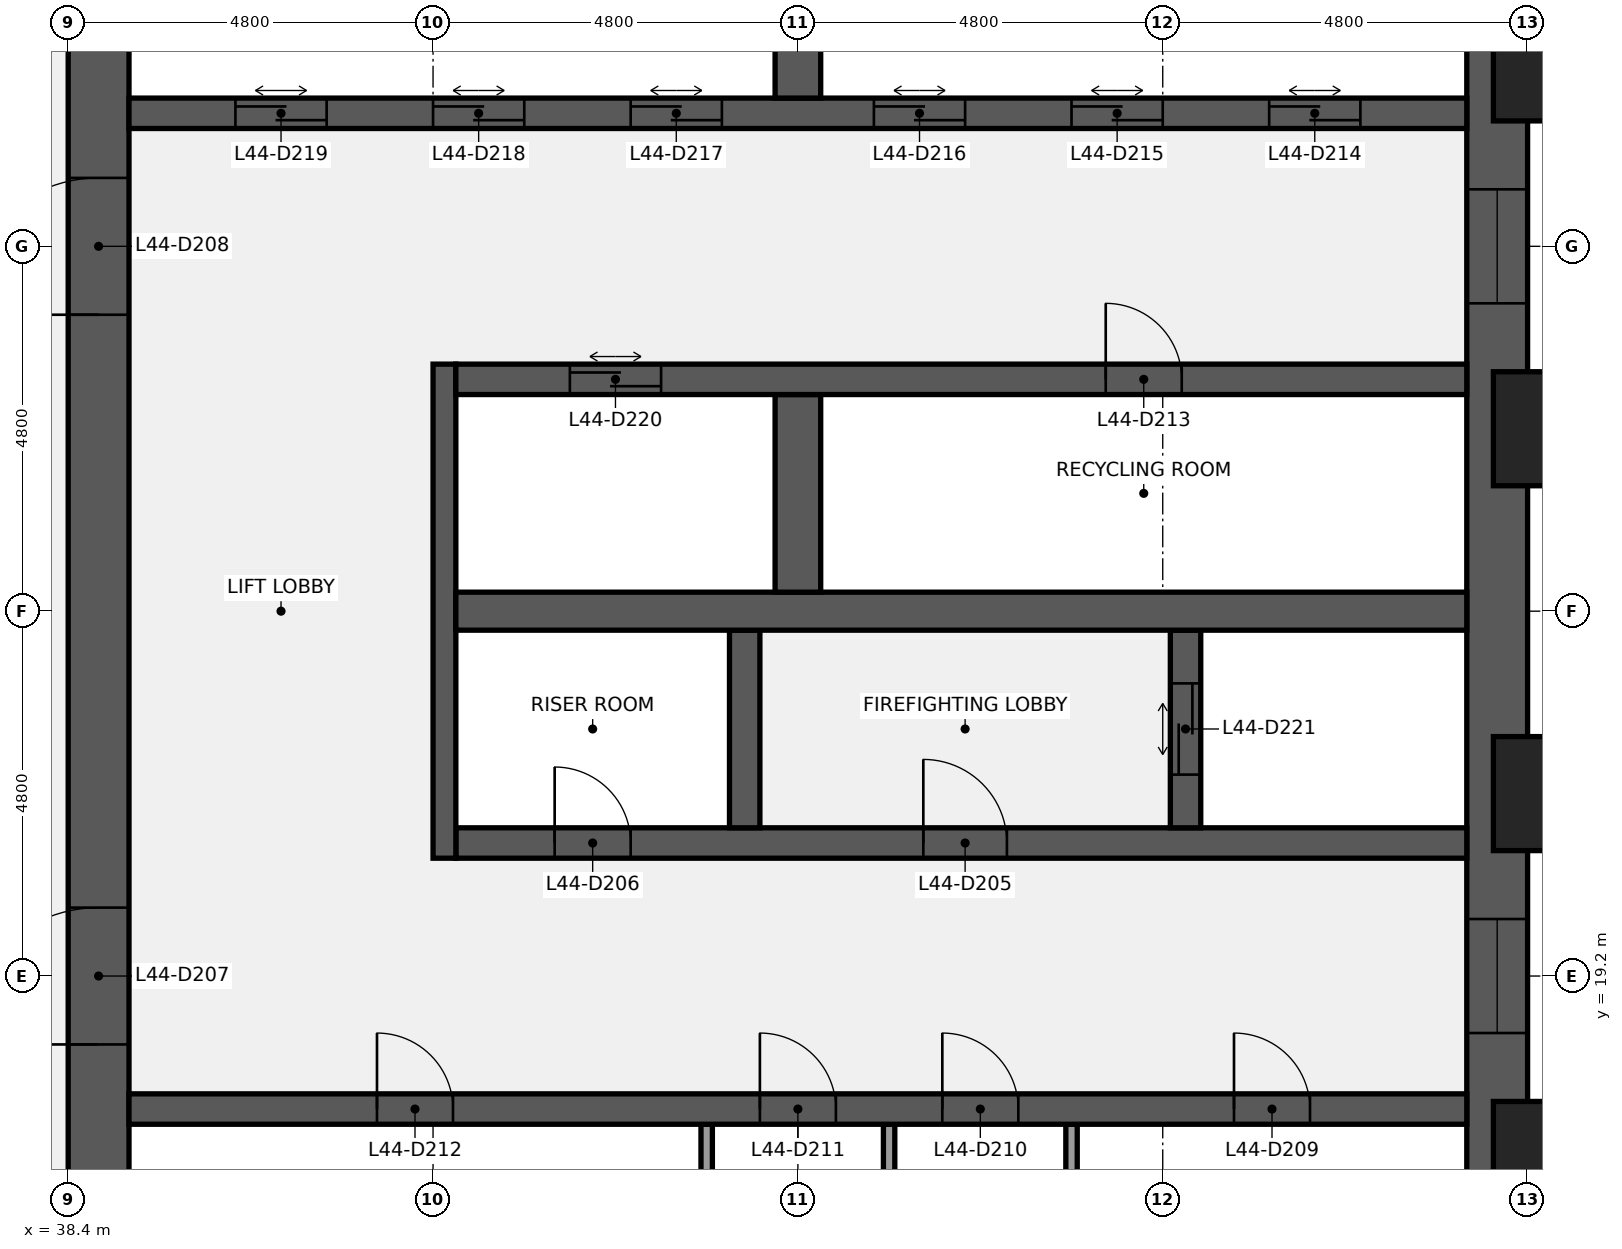
"""IFC4 building model, lengths in metres.
Left out: names, types, materials, properties, quantities, classifications, styles, units other than length and angle.
Written with IfcOpenShell. Run it as: python <this file> out.ifc"""

import sys

from ifc_helpers import new_model, si_unit, direction, frame, frame_2d, origin, origin_2d, place, context, subcontext, project, spatial, rectangle, extrude, element, fill, save


model = new_model("IFC4")
c1 = context("Model", 3, precision=1e-05, world=origin(), true_north=direction((0.0, 1.0)))
c2 = subcontext(c1, "Body", "Model", "MODEL_VIEW")
j1 = project(units=[si_unit("LENGTHUNIT", "METRE"), si_unit("PLANEANGLEUNIT", "RADIAN")], contexts=[c1])
p1 = place(None, origin())
s1 = spatial("IfcSite", under=j1, at=p1, CompositionType="ELEMENT")
p2 = place(p1, origin())
s2 = spatial("IfcBuilding", under=s1, at=p2, CompositionType="ELEMENT")
p3 = place(p2, frame((0.0, 0.0, 205.2)))
s3 = spatial("IfcBuildingStorey", under=s2, at=p3, CompositionType="ELEMENT", Elevation=205.2)
p4 = place(p3, frame((57.2, 38.4, 0.0), z_axis=(0.0, 0.0, 1.0), x_axis=(0.0, -1.0, 0.0)))
e1 = element("IfcWall", 1, at=p4, inside=s3, PredefinedType="SHEAR", context=c2, shape_type="SweptSolid", body=[
    extrude(rectangle(XDim=28.8, YDim=0.8, at=frame_2d((14.4, 0.0))), origin(), (0.0, 0.0, 1.0), 3.84),
])
p5 = place(p4, frame((18.45, 0.0, 0.9)))
e2 = element("IfcOpeningElement", 2, at=p5, cuts=e1, PredefinedType="OPENING", context=c2, shape_type="SweptSolid", body=[
    extrude(rectangle(XDim=1.5, YDim=1.5, at=frame_2d((0.75, 0.75))), frame((0.0, 0.41, 0.0), z_axis=(0.0, -1.0, 0.0), x_axis=(1.0, 0.0, 0.0)), (0.0, 0.0, 1.0), 0.82),
])
p6 = place(p4, frame((8.85, 0.0, 0.9)))
e3 = element("IfcOpeningElement", 3, at=p6, cuts=e1, PredefinedType="OPENING", context=c2, shape_type="SweptSolid", body=[
    extrude(rectangle(XDim=1.5, YDim=1.5, at=frame_2d((0.75, 0.75))), frame((0.0, 0.41, 0.0), z_axis=(0.0, -1.0, 0.0), x_axis=(1.0, 0.0, 0.0)), (0.0, 0.0, 1.0), 0.82),
])
p7 = place(p3, frame((38.8, 9.6, 0.0), z_axis=(0.0, 0.0, 1.0), x_axis=(0.0, 1.0, 0.0)))
e4 = element("IfcWall", 4, at=p7, inside=s3, PredefinedType="SHEAR", context=c2, shape_type="SweptSolid", body=[
    extrude(rectangle(XDim=28.8, YDim=0.8, at=frame_2d((14.4, 0.0))), origin(), (0.0, 0.0, 1.0), 3.84),
])
p8 = place(p7, frame((8.7, 0.0, 0.0)))
e5 = element("IfcOpeningElement", 5, at=p8, cuts=e4, PredefinedType="OPENING", context=c2, shape_type="SweptSolid", body=[
    extrude(rectangle(XDim=1.8, YDim=2.1, at=frame_2d((0.9, 1.05))), frame((0.0, 0.41, 0.0), z_axis=(0.0, -1.0, 0.0), x_axis=(1.0, 0.0, 0.0)), (0.0, 0.0, 1.0), 0.82),
])
p9 = place(p7, frame((18.3, 0.0, 0.0)))
e6 = element("IfcOpeningElement", 6, at=p9, cuts=e4, PredefinedType="OPENING", context=c2, shape_type="SweptSolid", body=[
    extrude(rectangle(XDim=1.8, YDim=2.1, at=frame_2d((0.9, 1.05))), frame((0.0, 0.41, 0.0), z_axis=(0.0, -1.0, 0.0), x_axis=(1.0, 0.0, 0.0)), (0.0, 0.0, 1.0), 0.82),
])
for number, where, z_axis, x_axis in (
    (7, (51.6, 14.65, 0.0), (0.0, 0.0, 1.0), (0.0, 1.0, 0.0)),
    (8, (49.2, 14.65, 0.0), (0.0, 0.0, 1.0), (0.0, 1.0, 0.0)),
    (9, (46.8, 14.65, 0.0), (0.0, 0.0, 1.0), (0.0, 1.0, 0.0)),
):
    element("IfcWall", number, at=place(p3, frame(where, z_axis=z_axis, x_axis=x_axis)), inside=s3, PredefinedType="PARTITIONING", context=c2, shape_type="SweptSolid", body=[
        extrude(rectangle(XDim=2.6, YDim=0.15, at=frame_2d((1.3, 0.0))), origin(), (0.0, 0.0, 1.0), 3.84),
    ])
p10 = place(p3, frame((39.2, 17.45, 0.0), z_axis=(0.0, 0.0, 1.0), x_axis=(1.0, 0.0, 0.0)))
e10 = element("IfcWall", 10, at=p10, inside=s3, PredefinedType="SHEAR", context=c2, shape_type="SweptSolid", body=[
    extrude(rectangle(XDim=17.6, YDim=0.4, at=frame_2d((8.8, 0.0))), origin(), (0.0, 0.0, 1.0), 3.84),
])
p11 = place(p10, frame((14.538, 0.0, 0.0)))
e11 = element("IfcOpeningElement", 11, at=p11, cuts=e10, PredefinedType="OPENING", context=c2, shape_type="SweptSolid", body=[
    extrude(rectangle(XDim=1.0, YDim=2.1, at=frame_2d((0.5, 1.05))), frame((0.0, 0.21, 0.0), z_axis=(0.0, -1.0, 0.0), x_axis=(1.0, 0.0, 0.0)), (0.0, 0.0, 1.0), 0.42),
])
p12 = place(p10, frame((10.7, 0.0, 0.0)))
e12 = element("IfcOpeningElement", 12, at=p12, cuts=e10, PredefinedType="OPENING", context=c2, shape_type="SweptSolid", body=[
    extrude(rectangle(XDim=1.0, YDim=2.1, at=frame_2d((0.5, 1.05))), frame((0.0, 0.21, 0.0), z_axis=(0.0, -1.0, 0.0), x_axis=(1.0, 0.0, 0.0)), (0.0, 0.0, 1.0), 0.42),
])
p13 = place(p10, frame((8.3, 0.0, 0.0)))
e13 = element("IfcOpeningElement", 13, at=p13, cuts=e10, PredefinedType="OPENING", context=c2, shape_type="SweptSolid", body=[
    extrude(rectangle(XDim=1.0, YDim=2.1, at=frame_2d((0.5, 1.05))), frame((0.0, 0.21, 0.0), z_axis=(0.0, -1.0, 0.0), x_axis=(1.0, 0.0, 0.0)), (0.0, 0.0, 1.0), 0.42),
])
p14 = place(p10, frame((3.262, 0.0, 0.0)))
e14 = element("IfcOpeningElement", 14, at=p14, cuts=e10, PredefinedType="OPENING", context=c2, shape_type="SweptSolid", body=[
    extrude(rectangle(XDim=1.0, YDim=2.1, at=frame_2d((0.5, 1.05))), frame((0.0, 0.21, 0.0), z_axis=(0.0, -1.0, 0.0), x_axis=(1.0, 0.0, 0.0)), (0.0, 0.0, 1.0), 0.42),
])
p15 = place(p3, frame((43.5, 20.95, 0.0), z_axis=(0.0, 0.0, 1.0), x_axis=(1.0, 0.0, 0.0)))
e15 = element("IfcWall", 15, at=p15, inside=s3, PredefinedType="SHEAR", context=c2, shape_type="SweptSolid", body=[
    extrude(rectangle(XDim=13.3, YDim=0.4, at=frame_2d((6.65, 0.0))), origin(), (0.0, 0.0, 1.0), 3.84),
])
p16 = place(p15, frame((6.15, 0.0, 0.0)))
e16 = element("IfcOpeningElement", 16, at=p16, cuts=e15, PredefinedType="OPENING", context=c2, shape_type="SweptSolid", body=[
    extrude(rectangle(XDim=1.1, YDim=2.1, at=frame_2d((0.55, 1.05))), frame((0.0, 0.21, 0.0), z_axis=(0.0, -1.0, 0.0), x_axis=(1.0, 0.0, 0.0)), (0.0, 0.0, 1.0), 0.42),
])
p17 = place(p15, frame((1.3, 0.0, 0.0)))
e17 = element("IfcOpeningElement", 17, at=p17, cuts=e15, PredefinedType="OPENING", context=c2, shape_type="SweptSolid", body=[
    extrude(rectangle(XDim=1.0, YDim=2.1, at=frame_2d((0.5, 1.05))), frame((0.0, 0.21, 0.0), z_axis=(0.0, -1.0, 0.0), x_axis=(1.0, 0.0, 0.0)), (0.0, 0.0, 1.0), 0.42),
])
p18 = place(p3, frame((43.35, 20.75, 0.0), z_axis=(0.0, 0.0, 1.0), x_axis=(0.0, 1.0, 0.0)))
e18 = element("IfcWall", 18, at=p18, inside=s3, PredefinedType="SHEAR", context=c2, shape_type="SweptSolid", body=[
    extrude(rectangle(XDim=6.5, YDim=0.3, at=frame_2d((3.25, 0.0))), origin(), (0.0, 0.0, 1.0), 3.84),
])
p19 = place(p3, frame((53.1, 21.15, 0.0), z_axis=(0.0, 0.0, 1.0), x_axis=(0.0, 1.0, 0.0)))
e19 = element("IfcWall", 19, at=p19, inside=s3, PredefinedType="SHEAR", context=c2, shape_type="SweptSolid", body=[
    extrude(rectangle(XDim=2.6, YDim=0.4, at=frame_2d((1.3, 0.0))), origin(), (0.0, 0.0, 1.0), 3.84),
])
p20 = place(p19, frame((0.7, 0.0, 0.0)))
e20 = element("IfcOpeningElement", 20, at=p20, cuts=e19, PredefinedType="OPENING", context=c2, shape_type="SweptSolid", body=[
    extrude(rectangle(XDim=1.2, YDim=2.1, at=frame_2d((0.6, 1.05))), frame((0.0, 0.21, 0.0), z_axis=(0.0, -1.0, 0.0), x_axis=(1.0, 0.0, 0.0)), (0.0, 0.0, 1.0), 0.42),
])
p21 = place(p3, frame((47.3, 21.15, 0.0), z_axis=(0.0, 0.0, 1.0), x_axis=(0.0, 1.0, 0.0)))
e21 = element("IfcWall", 21, at=p21, inside=s3, PredefinedType="SHEAR", context=c2, shape_type="SweptSolid", body=[
    extrude(rectangle(XDim=2.6, YDim=0.4, at=frame_2d((1.3, 0.0))), origin(), (0.0, 0.0, 1.0), 3.84),
])
p22 = place(p3, frame((43.5, 24.0, 0.0), z_axis=(0.0, 0.0, 1.0), x_axis=(1.0, 0.0, 0.0)))
e22 = element("IfcWall", 22, at=p22, inside=s3, PredefinedType="SHEAR", context=c2, shape_type="SweptSolid", body=[
    extrude(rectangle(XDim=13.3, YDim=0.5, at=frame_2d((6.65, 0.0))), origin(), (0.0, 0.0, 1.0), 3.84),
])
p23 = place(p3, frame((48.0, 24.25, 0.0), z_axis=(0.0, 0.0, 1.0), x_axis=(0.0, 1.0, 0.0)))
e23 = element("IfcWall", 23, at=p23, inside=s3, PredefinedType="SHEAR", context=c2, shape_type="SweptSolid", body=[
    extrude(rectangle(XDim=2.6, YDim=0.6, at=frame_2d((1.3, 0.0))), origin(), (0.0, 0.0, 1.0), 3.84),
])
p24 = place(p3, frame((43.5, 27.05, 0.0), z_axis=(0.0, 0.0, 1.0), x_axis=(1.0, 0.0, 0.0)))
e24 = element("IfcWall", 24, at=p24, inside=s3, PredefinedType="SHEAR", context=c2, shape_type="SweptSolid", body=[
    extrude(rectangle(XDim=13.3, YDim=0.4, at=frame_2d((6.65, 0.0))), origin(), (0.0, 0.0, 1.0), 3.84),
])
p25 = place(p24, frame((8.55, 0.0, 0.0)))
e25 = element("IfcOpeningElement", 25, at=p25, cuts=e24, PredefinedType="OPENING", context=c2, shape_type="SweptSolid", body=[
    extrude(rectangle(XDim=1.0, YDim=2.1, at=frame_2d((0.5, 1.05))), frame((0.0, 0.21, 0.0), z_axis=(0.0, -1.0, 0.0), x_axis=(1.0, 0.0, 0.0)), (0.0, 0.0, 1.0), 0.42),
])
p26 = place(p24, frame((1.5, 0.0, 0.0)))
e26 = element("IfcOpeningElement", 26, at=p26, cuts=e24, PredefinedType="OPENING", context=c2, shape_type="SweptSolid", body=[
    extrude(rectangle(XDim=1.2, YDim=2.1, at=frame_2d((0.6, 1.05))), frame((0.0, 0.21, 0.0), z_axis=(0.0, -1.0, 0.0), x_axis=(1.0, 0.0, 0.0)), (0.0, 0.0, 1.0), 0.42),
])
p27 = place(p3, frame((39.2, 30.55, 0.0), z_axis=(0.0, 0.0, 1.0), x_axis=(1.0, 0.0, 0.0)))
e27 = element("IfcWall", 27, at=p27, inside=s3, PredefinedType="SHEAR", context=c2, shape_type="SweptSolid", body=[
    extrude(rectangle(XDim=17.6, YDim=0.4, at=frame_2d((8.8, 0.0))), origin(), (0.0, 0.0, 1.0), 3.84),
])
p28 = place(p27, frame((15.0, 0.0, 0.0)))
e28 = element("IfcOpeningElement", 28, at=p28, cuts=e27, PredefinedType="OPENING", context=c2, shape_type="SweptSolid", body=[
    extrude(rectangle(XDim=1.2, YDim=2.1, at=frame_2d((0.6, 1.05))), frame((0.0, 0.21, 0.0), z_axis=(0.0, -1.0, 0.0), x_axis=(1.0, 0.0, 0.0)), (0.0, 0.0, 1.0), 0.42),
])
p29 = place(p27, frame((12.4, 0.0, 0.0)))
e29 = element("IfcOpeningElement", 29, at=p29, cuts=e27, PredefinedType="OPENING", context=c2, shape_type="SweptSolid", body=[
    extrude(rectangle(XDim=1.2, YDim=2.1, at=frame_2d((0.6, 1.05))), frame((0.0, 0.21, 0.0), z_axis=(0.0, -1.0, 0.0), x_axis=(1.0, 0.0, 0.0)), (0.0, 0.0, 1.0), 0.42),
])
p30 = place(p27, frame((9.8, 0.0, 0.0)))
e30 = element("IfcOpeningElement", 30, at=p30, cuts=e27, PredefinedType="OPENING", context=c2, shape_type="SweptSolid", body=[
    extrude(rectangle(XDim=1.2, YDim=2.1, at=frame_2d((0.6, 1.05))), frame((0.0, 0.21, 0.0), z_axis=(0.0, -1.0, 0.0), x_axis=(1.0, 0.0, 0.0)), (0.0, 0.0, 1.0), 0.42),
])
p31 = place(p27, frame((6.6, 0.0, 0.0)))
e31 = element("IfcOpeningElement", 31, at=p31, cuts=e27, PredefinedType="OPENING", context=c2, shape_type="SweptSolid", body=[
    extrude(rectangle(XDim=1.2, YDim=2.1, at=frame_2d((0.6, 1.05))), frame((0.0, 0.21, 0.0), z_axis=(0.0, -1.0, 0.0), x_axis=(1.0, 0.0, 0.0)), (0.0, 0.0, 1.0), 0.42),
])
p32 = place(p27, frame((4.0, 0.0, 0.0)))
e32 = element("IfcOpeningElement", 32, at=p32, cuts=e27, PredefinedType="OPENING", context=c2, shape_type="SweptSolid", body=[
    extrude(rectangle(XDim=1.2, YDim=2.1, at=frame_2d((0.6, 1.05))), frame((0.0, 0.21, 0.0), z_axis=(0.0, -1.0, 0.0), x_axis=(1.0, 0.0, 0.0)), (0.0, 0.0, 1.0), 0.42),
])
p33 = place(p27, frame((1.4, 0.0, 0.0)))
e33 = element("IfcOpeningElement", 33, at=p33, cuts=e27, PredefinedType="OPENING", context=c2, shape_type="SweptSolid", body=[
    extrude(rectangle(XDim=1.2, YDim=2.1, at=frame_2d((0.6, 1.05))), frame((0.0, 0.21, 0.0), z_axis=(0.0, -1.0, 0.0), x_axis=(1.0, 0.0, 0.0)), (0.0, 0.0, 1.0), 0.42),
])
p34 = place(p3, frame((48.0, 30.75, 0.0), z_axis=(0.0, 0.0, 1.0), x_axis=(0.0, 1.0, 0.0)))
e34 = element("IfcWall", 34, at=p34, inside=s3, PredefinedType="SHEAR", context=c2, shape_type="SweptSolid", body=[
    extrude(rectangle(XDim=2.6, YDim=0.6, at=frame_2d((1.3, 0.0))), origin(), (0.0, 0.0, 1.0), 3.84),
])
for number, where, z_axis, x_axis in (
    (35, (58.35, 16.8, 0.0), (0.0, 0.0, 1.0), (0.0, 1.0, 0.0)),
    (36, (58.35, 21.6, 0.0), (0.0, 0.0, 1.0), (0.0, 1.0, 0.0)),
    (37, (58.35, 26.4, 0.0), (0.0, 0.0, 1.0), (0.0, 1.0, 0.0)),
    (38, (58.35, 31.2, 0.0), (0.0, 0.0, 1.0), (0.0, 1.0, 0.0)),
):
    element("IfcColumn", number, at=place(p3, frame(where, z_axis=z_axis, x_axis=x_axis)), inside=s3, PredefinedType="PILASTER", context=c2, shape_type="SweptSolid", body=[
        extrude(rectangle(XDim=2.4, YDim=1.5, at=origin_2d()), origin(), (0.0, 0.0, 1.0), 4.0),
    ])
p35 = place(p16, origin())
e39 = element("IfcDoor", 39, at=p35, inside=s3, OperationType="SINGLE_SWING_LEFT", PredefinedType="DOOR", context=c2, shape_type="SweptSolid", body=[
    extrude(rectangle(XDim=1.1, YDim=2.1, at=frame_2d((0.55, 1.05))), frame((0.0, 0.025, 0.0), z_axis=(0.0, -1.0, 0.0), x_axis=(1.0, 0.0, 0.0)), (0.0, 0.0, 1.0), 0.05),
])
fill(e16, e39)
p36 = place(p17, origin())
e40 = element("IfcDoor", 40, at=p36, inside=s3, OperationType="SINGLE_SWING_LEFT", PredefinedType="DOOR", context=c2, shape_type="SweptSolid", body=[
    extrude(rectangle(XDim=1.0, YDim=2.1, at=frame_2d((0.5, 1.05))), frame((0.0, 0.025, 0.0), z_axis=(0.0, -1.0, 0.0), x_axis=(1.0, 0.0, 0.0)), (0.0, 0.0, 1.0), 0.05),
])
fill(e17, e40)
p37 = place(p8, origin())
e41 = element("IfcDoor", 41, at=p37, inside=s3, OperationType="DOUBLE_DOOR_SINGLE_SWING", PredefinedType="DOOR", context=c2, shape_type="SweptSolid", body=[
    extrude(rectangle(XDim=1.8, YDim=2.1, at=frame_2d((0.9, 1.05))), frame((0.0, 0.025, 0.0), z_axis=(0.0, -1.0, 0.0), x_axis=(1.0, 0.0, 0.0)), (0.0, 0.0, 1.0), 0.05),
])
fill(e5, e41)
p38 = place(p9, origin())
e42 = element("IfcDoor", 42, at=p38, inside=s3, OperationType="DOUBLE_DOOR_SINGLE_SWING", PredefinedType="DOOR", context=c2, shape_type="SweptSolid", body=[
    extrude(rectangle(XDim=1.8, YDim=2.1, at=frame_2d((0.9, 1.05))), frame((0.0, 0.025, 0.0), z_axis=(0.0, -1.0, 0.0), x_axis=(1.0, 0.0, 0.0)), (0.0, 0.0, 1.0), 0.05),
])
fill(e6, e42)
p39 = place(p11, origin())
e43 = element("IfcDoor", 43, at=p39, inside=s3, OperationType="SINGLE_SWING_LEFT", PredefinedType="DOOR", context=c2, shape_type="SweptSolid", body=[
    extrude(rectangle(XDim=1.0, YDim=2.1, at=frame_2d((0.5, 1.05))), frame((0.0, 0.025, 0.0), z_axis=(0.0, -1.0, 0.0), x_axis=(1.0, 0.0, 0.0)), (0.0, 0.0, 1.0), 0.05),
])
fill(e11, e43)
p40 = place(p12, origin())
e44 = element("IfcDoor", 44, at=p40, inside=s3, OperationType="SINGLE_SWING_LEFT", PredefinedType="DOOR", context=c2, shape_type="SweptSolid", body=[
    extrude(rectangle(XDim=1.0, YDim=2.1, at=frame_2d((0.5, 1.05))), frame((0.0, 0.025, 0.0), z_axis=(0.0, -1.0, 0.0), x_axis=(1.0, 0.0, 0.0)), (0.0, 0.0, 1.0), 0.05),
])
fill(e12, e44)
p41 = place(p13, origin())
e45 = element("IfcDoor", 45, at=p41, inside=s3, OperationType="SINGLE_SWING_LEFT", PredefinedType="DOOR", context=c2, shape_type="SweptSolid", body=[
    extrude(rectangle(XDim=1.0, YDim=2.1, at=frame_2d((0.5, 1.05))), frame((0.0, 0.025, 0.0), z_axis=(0.0, -1.0, 0.0), x_axis=(1.0, 0.0, 0.0)), (0.0, 0.0, 1.0), 0.05),
])
fill(e13, e45)
p42 = place(p14, origin())
e46 = element("IfcDoor", 46, at=p42, inside=s3, OperationType="SINGLE_SWING_LEFT", PredefinedType="DOOR", context=c2, shape_type="SweptSolid", body=[
    extrude(rectangle(XDim=1.0, YDim=2.1, at=frame_2d((0.5, 1.05))), frame((0.0, 0.025, 0.0), z_axis=(0.0, -1.0, 0.0), x_axis=(1.0, 0.0, 0.0)), (0.0, 0.0, 1.0), 0.05),
])
fill(e14, e46)
p43 = place(p25, origin())
e47 = element("IfcDoor", 47, at=p43, inside=s3, OperationType="SINGLE_SWING_LEFT", PredefinedType="DOOR", context=c2, shape_type="SweptSolid", body=[
    extrude(rectangle(XDim=1.0, YDim=2.1, at=frame_2d((0.5, 1.05))), frame((0.0, 0.025, 0.0), z_axis=(0.0, -1.0, 0.0), x_axis=(1.0, 0.0, 0.0)), (0.0, 0.0, 1.0), 0.05),
])
fill(e25, e47)
p44 = place(p28, origin())
e48 = element("IfcDoor", 48, at=p44, inside=s3, OperationType="DOUBLE_DOOR_SLIDING", PredefinedType="DOOR", context=c2, shape_type="SweptSolid", body=[
    extrude(rectangle(XDim=1.2, YDim=2.1, at=frame_2d((0.6, 1.05))), frame((0.0, 0.025, 0.0), z_axis=(0.0, -1.0, 0.0), x_axis=(1.0, 0.0, 0.0)), (0.0, 0.0, 1.0), 0.05),
])
fill(e28, e48)
p45 = place(p29, origin())
e49 = element("IfcDoor", 49, at=p45, inside=s3, OperationType="DOUBLE_DOOR_SLIDING", PredefinedType="DOOR", context=c2, shape_type="SweptSolid", body=[
    extrude(rectangle(XDim=1.2, YDim=2.1, at=frame_2d((0.6, 1.05))), frame((0.0, 0.025, 0.0), z_axis=(0.0, -1.0, 0.0), x_axis=(1.0, 0.0, 0.0)), (0.0, 0.0, 1.0), 0.05),
])
fill(e29, e49)
p46 = place(p30, origin())
e50 = element("IfcDoor", 50, at=p46, inside=s3, OperationType="DOUBLE_DOOR_SLIDING", PredefinedType="DOOR", context=c2, shape_type="SweptSolid", body=[
    extrude(rectangle(XDim=1.2, YDim=2.1, at=frame_2d((0.6, 1.05))), frame((0.0, 0.025, 0.0), z_axis=(0.0, -1.0, 0.0), x_axis=(1.0, 0.0, 0.0)), (0.0, 0.0, 1.0), 0.05),
])
fill(e30, e50)
p47 = place(p31, origin())
e51 = element("IfcDoor", 51, at=p47, inside=s3, OperationType="DOUBLE_DOOR_SLIDING", PredefinedType="DOOR", context=c2, shape_type="SweptSolid", body=[
    extrude(rectangle(XDim=1.2, YDim=2.1, at=frame_2d((0.6, 1.05))), frame((0.0, 0.025, 0.0), z_axis=(0.0, -1.0, 0.0), x_axis=(1.0, 0.0, 0.0)), (0.0, 0.0, 1.0), 0.05),
])
fill(e31, e51)
p48 = place(p32, origin())
e52 = element("IfcDoor", 52, at=p48, inside=s3, OperationType="DOUBLE_DOOR_SLIDING", PredefinedType="DOOR", context=c2, shape_type="SweptSolid", body=[
    extrude(rectangle(XDim=1.2, YDim=2.1, at=frame_2d((0.6, 1.05))), frame((0.0, 0.025, 0.0), z_axis=(0.0, -1.0, 0.0), x_axis=(1.0, 0.0, 0.0)), (0.0, 0.0, 1.0), 0.05),
])
fill(e32, e52)
p49 = place(p33, origin())
e53 = element("IfcDoor", 53, at=p49, inside=s3, OperationType="DOUBLE_DOOR_SLIDING", PredefinedType="DOOR", context=c2, shape_type="SweptSolid", body=[
    extrude(rectangle(XDim=1.2, YDim=2.1, at=frame_2d((0.6, 1.05))), frame((0.0, 0.025, 0.0), z_axis=(0.0, -1.0, 0.0), x_axis=(1.0, 0.0, 0.0)), (0.0, 0.0, 1.0), 0.05),
])
fill(e33, e53)
p50 = place(p26, origin())
e54 = element("IfcDoor", 54, at=p50, inside=s3, OperationType="DOUBLE_DOOR_SLIDING", PredefinedType="DOOR", context=c2, shape_type="SweptSolid", body=[
    extrude(rectangle(XDim=1.2, YDim=2.1, at=frame_2d((0.6, 1.05))), frame((0.0, 0.025, 0.0), z_axis=(0.0, -1.0, 0.0), x_axis=(1.0, 0.0, 0.0)), (0.0, 0.0, 1.0), 0.05),
])
fill(e26, e54)
p51 = place(p20, origin())
e55 = element("IfcDoor", 55, at=p51, inside=s3, OperationType="DOUBLE_DOOR_SLIDING", PredefinedType="DOOR", context=c2, shape_type="SweptSolid", body=[
    extrude(rectangle(XDim=1.2, YDim=2.1, at=frame_2d((0.6, 1.05))), frame((0.0, 0.025, 0.0), z_axis=(0.0, -1.0, 0.0), x_axis=(1.0, 0.0, 0.0)), (0.0, 0.0, 1.0), 0.05),
])
fill(e20, e55)
p52 = place(p5, origin())
e56 = element("IfcWindow", 56, at=p52, inside=s3, PartitioningType="SINGLE_PANEL", PredefinedType="WINDOW", context=c2, shape_type="SweptSolid", body=[
    extrude(rectangle(XDim=1.5, YDim=1.5, at=frame_2d((0.75, 0.75))), frame((0.0, 0.03, 0.0), z_axis=(0.0, -1.0, 0.0), x_axis=(1.0, 0.0, 0.0)), (0.0, 0.0, 1.0), 0.06),
])
fill(e2, e56)
p53 = place(p6, origin())
e57 = element("IfcWindow", 57, at=p53, inside=s3, PartitioningType="SINGLE_PANEL", PredefinedType="WINDOW", context=c2, shape_type="SweptSolid", body=[
    extrude(rectangle(XDim=1.5, YDim=1.5, at=frame_2d((0.75, 0.75))), frame((0.0, 0.03, 0.0), z_axis=(0.0, -1.0, 0.0), x_axis=(1.0, 0.0, 0.0)), (0.0, 0.0, 1.0), 0.06),
])
fill(e3, e57)
save(model, sys.argv[1])
